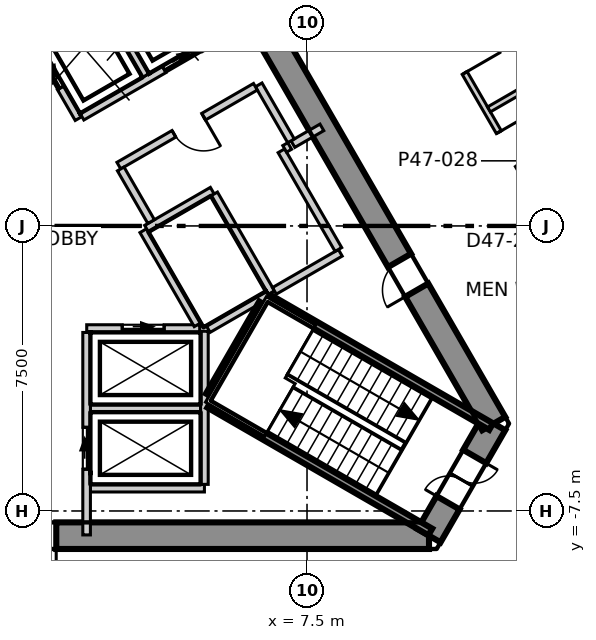
"""IFC4 building model, lengths in metres.
Left out: names, types, materials, properties, quantities, classifications, styles, units other than length and angle.
Written with IfcOpenShell. Run it as: python <this file> out.ifc"""

import sys

from ifc_helpers import new_model, si_unit, direction, frame, frame_2d, origin, place, context, subcontext, project, spatial, polyline, rectangle, outline, extrude, element, fill, save


model = new_model("IFC4")
c1 = context("Model", 3, precision=1e-05, world=origin(), true_north=direction((0.0, 1.0)))
c2 = subcontext(c1, "Body", "Model", "MODEL_VIEW")
j1 = project(units=[si_unit("LENGTHUNIT", "METRE"), si_unit("PLANEANGLEUNIT", "RADIAN")], contexts=[c1])
p1 = place(None, origin())
s1 = spatial("IfcSite", under=j1, at=p1, CompositionType="ELEMENT")
p2 = place(p1, origin())
s2 = spatial("IfcBuilding", under=s1, at=p2, CompositionType="ELEMENT")
p3 = place(p2, frame((0.0, 0.0, 203.3)))
s3 = spatial("IfcBuildingStorey", under=s2, at=p3, CompositionType="ELEMENT", Elevation=203.3)
p4 = place(p3, frame((-10.71, -8.15, -0.3), z_axis=(0.0, 0.0, 1.0), x_axis=(1.0, 0.0, 0.0)))
e1 = element("IfcWall", 1, at=p4, inside=s3, PredefinedType="SHEAR", context=c2, shape_type="SweptSolid", body=[
    extrude(outline(polyline([(-0.202, -0.35), (1.782, -0.35), (3.766, -0.35), (5.75, -0.35), (7.734, -0.35), (9.718, -0.35), (11.702, -0.35), (13.686, -0.35), (15.67, -0.35), (17.654, -0.35), (19.638, -0.35), (21.622, -0.35), (21.218, 0.35), (19.307, 0.35), (17.397, 0.35), (15.486, 0.35), (13.576, 0.35), (11.665, 0.35), (9.755, 0.35), (7.844, 0.35), (5.934, 0.35), (4.023, 0.35), (2.113, 0.35), (0.202, 0.35), (-0.202, -0.35)])), origin(), (0.0, 0.0, 1.0), 4.0),
])
p5 = place(p4, frame((9.81, 0.0, 0.3)))
e2 = element("IfcOpeningElement", 2, at=p5, cuts=e1, PredefinedType="OPENING", context=c2, shape_type="SweptSolid", body=[
    extrude(rectangle(XDim=1.8, YDim=2.1, at=frame_2d((0.9, 1.05))), frame((0.0, 0.36, 0.0), z_axis=(0.0, -1.0, 0.0), x_axis=(1.0, 0.0, 0.0)), (0.0, 0.0, 1.0), 0.72),
])
p6 = place(p3, frame((10.71, -8.15, -0.3), z_axis=(0.0, 0.0, 1.0), x_axis=(0.49999337185, 0.866029230515, 0.0)))
e3 = element("IfcWall", 3, at=p6, inside=s3, PredefinedType="SHEAR", context=c2, shape_type="SweptSolid", body=[
    extrude(outline(polyline([(-0.202, -0.35), (1.703, -0.35), (3.608, -0.35), (3.204, 0.35), (1.703, 0.35), (0.202, 0.35), (-0.202, -0.35)])), origin(), (0.0, 0.0, 1.0), 4.0),
])
p7 = place(p6, frame((1.003, 0.0, 0.3)))
e4 = element("IfcOpeningElement", 4, at=p7, cuts=e3, PredefinedType="OPENING", context=c2, shape_type="SweptSolid", body=[
    extrude(rectangle(XDim=1.4, YDim=2.1, at=frame_2d((0.7, 1.05))), frame((0.0, 0.36, 0.0), z_axis=(0.0, -1.0, 0.0), x_axis=(1.0, 0.0, 0.0)), (0.0, 0.0, 1.0), 0.72),
])
p8 = place(p3, frame((12.413, -5.2, -0.3), z_axis=(0.0, 0.0, 1.0), x_axis=(-0.500011533395, 0.866018744874, 0.0)))
e5 = element("IfcWall", 5, at=p8, inside=s3, PredefinedType="SHEAR", context=c2, shape_type="SweptSolid", body=[
    extrude(outline(polyline([(-0.202, -0.35), (1.782, -0.35), (3.766, -0.35), (5.75, -0.35), (7.734, -0.35), (9.718, -0.35), (11.702, -0.35), (13.686, -0.35), (15.67, -0.35), (17.654, -0.35), (19.638, -0.35), (21.622, -0.35), (21.218, 0.35), (19.307, 0.35), (17.397, 0.35), (15.486, 0.35), (13.576, 0.35), (11.665, 0.35), (9.755, 0.35), (7.844, 0.35), (5.934, 0.35), (4.023, 0.35), (2.113, 0.35), (0.202, 0.35), (-0.202, -0.35)])), origin(), (0.0, 0.0, 1.0), 4.0),
])
p9 = place(p8, frame((4.055, 0.0, 0.3)))
e6 = element("IfcOpeningElement", 6, at=p9, cuts=e5, PredefinedType="OPENING", context=c2, shape_type="SweptSolid", body=[
    extrude(rectangle(XDim=0.9, YDim=2.1, at=frame_2d((0.45, 1.05))), frame((0.0, 0.36, 0.0), z_axis=(0.0, -1.0, 0.0), x_axis=(1.0, 0.0, 0.0)), (0.0, 0.0, 1.0), 0.72),
])
p10 = place(p8, frame((16.415, 0.0, 0.3)))
e7 = element("IfcOpeningElement", 7, at=p10, cuts=e5, PredefinedType="OPENING", context=c2, shape_type="SweptSolid", body=[
    extrude(rectangle(XDim=1.0, YDim=2.1, at=frame_2d((0.5, 1.05))), frame((0.0, 0.36, 0.0), z_axis=(0.0, -1.0, 0.0), x_axis=(1.0, 0.0, 0.0)), (0.0, 0.0, 1.0), 0.72),
])
p11 = place(p3, frame((28.704, -13.311, 0.0), z_axis=(0.0, 0.0, 1.0), x_axis=(-0.500010281129, 0.866019467891, 0.0)))
e8 = element("IfcWall", 8, at=p11, inside=s3, PredefinedType="ELEMENTEDWALL", context=c2, shape_type="SweptSolid", body=[
    extrude(rectangle(XDim=51.739, YDim=0.2, at=frame_2d((25.87, 0.0))), origin(), (0.0, 0.0, 1.0), 3.7),
])
p12 = place(p11, frame((2.275, 0.0, 0.9)))
e9 = element("IfcOpeningElement", 9, at=p12, cuts=e8, PredefinedType="OPENING", context=c2, shape_type="SweptSolid", body=[
    extrude(rectangle(XDim=4.2, YDim=2.5, at=frame_2d((2.1, 1.25))), frame((0.0, 0.11, 0.0), z_axis=(0.0, -1.0, 0.0), x_axis=(1.0, 0.0, 0.0)), (0.0, 0.0, 1.0), 0.22),
])
p13 = place(p11, frame((8.419, 0.0, 0.9)))
e10 = element("IfcOpeningElement", 10, at=p13, cuts=e8, PredefinedType="OPENING", context=c2, shape_type="SweptSolid", body=[
    extrude(rectangle(XDim=4.2, YDim=2.5, at=frame_2d((2.1, 1.25))), frame((0.0, 0.11, 0.0), z_axis=(0.0, -1.0, 0.0), x_axis=(1.0, 0.0, 0.0)), (0.0, 0.0, 1.0), 0.22),
])
p14 = place(p11, frame((14.563, 0.0, 0.9)))
e11 = element("IfcOpeningElement", 11, at=p14, cuts=e8, PredefinedType="OPENING", context=c2, shape_type="SweptSolid", body=[
    extrude(rectangle(XDim=4.2, YDim=2.5, at=frame_2d((2.1, 1.25))), frame((0.0, 0.11, 0.0), z_axis=(0.0, -1.0, 0.0), x_axis=(1.0, 0.0, 0.0)), (0.0, 0.0, 1.0), 0.22),
])
p15 = place(p11, frame((20.707, 0.0, 0.9)))
e12 = element("IfcOpeningElement", 12, at=p15, cuts=e8, PredefinedType="OPENING", context=c2, shape_type="SweptSolid", body=[
    extrude(rectangle(XDim=4.2, YDim=2.5, at=frame_2d((2.1, 1.25))), frame((0.0, 0.11, 0.0), z_axis=(0.0, -1.0, 0.0), x_axis=(1.0, 0.0, 0.0)), (0.0, 0.0, 1.0), 0.22),
])
p16 = place(p11, frame((26.852, 0.0, 0.9)))
e13 = element("IfcOpeningElement", 13, at=p16, cuts=e8, PredefinedType="OPENING", context=c2, shape_type="SweptSolid", body=[
    extrude(rectangle(XDim=4.2, YDim=2.5, at=frame_2d((2.1, 1.25))), frame((0.0, 0.11, 0.0), z_axis=(0.0, -1.0, 0.0), x_axis=(1.0, 0.0, 0.0)), (0.0, 0.0, 1.0), 0.22),
])
p17 = place(p11, frame((32.996, 0.0, 0.9)))
e14 = element("IfcOpeningElement", 14, at=p17, cuts=e8, PredefinedType="OPENING", context=c2, shape_type="SweptSolid", body=[
    extrude(rectangle(XDim=4.2, YDim=2.5, at=frame_2d((2.1, 1.25))), frame((0.0, 0.11, 0.0), z_axis=(0.0, -1.0, 0.0), x_axis=(1.0, 0.0, 0.0)), (0.0, 0.0, 1.0), 0.22),
])
p18 = place(p11, frame((39.14, 0.0, 0.9)))
e15 = element("IfcOpeningElement", 15, at=p18, cuts=e8, PredefinedType="OPENING", context=c2, shape_type="SweptSolid", body=[
    extrude(rectangle(XDim=4.2, YDim=2.5, at=frame_2d((2.1, 1.25))), frame((0.0, 0.11, 0.0), z_axis=(0.0, -1.0, 0.0), x_axis=(1.0, 0.0, 0.0)), (0.0, 0.0, 1.0), 0.22),
])
p19 = place(p11, frame((45.284, 0.0, 0.9)))
e16 = element("IfcOpeningElement", 16, at=p19, cuts=e8, PredefinedType="OPENING", context=c2, shape_type="SweptSolid", body=[
    extrude(rectangle(XDim=4.2, YDim=2.5, at=frame_2d((2.1, 1.25))), frame((0.0, 0.11, 0.0), z_axis=(0.0, -1.0, 0.0), x_axis=(1.0, 0.0, 0.0)), (0.0, 0.0, 1.0), 0.22),
])
p20 = place(p3, frame((0.075, 24.07, 0.0), z_axis=(0.0, 0.0, 1.0), x_axis=(0.500006834213, -0.866021458014, 0.0)))
e17 = element("IfcWall", 17, at=p20, inside=s3, PredefinedType="PARTITIONING", context=c2, shape_type="SweptSolid", body=[
    extrude(rectangle(XDim=41.616, YDim=0.15, at=frame_2d((20.808, 0.0))), origin(), (0.0, 0.0, 1.0), 3.7),
])
p21 = place(p20, frame((36.915, 0.0, 0.0)))
e18 = element("IfcOpeningElement", 18, at=p21, cuts=e17, PredefinedType="OPENING", context=c2, shape_type="SweptSolid", body=[
    extrude(rectangle(XDim=1.1, YDim=2.1, at=frame_2d((0.55, 1.05))), frame((0.0, 0.085, 0.0), z_axis=(0.0, -1.0, 0.0), x_axis=(1.0, 0.0, 0.0)), (0.0, 0.0, 1.0), 0.17),
])
p22 = place(p20, frame((22.046, 0.0, 0.0)))
e19 = element("IfcOpeningElement", 19, at=p22, cuts=e17, PredefinedType="OPENING", context=c2, shape_type="SweptSolid", body=[
    extrude(rectangle(XDim=1.1, YDim=2.1, at=frame_2d((0.55, 1.05))), frame((0.0, 0.085, 0.0), z_axis=(0.0, -1.0, 0.0), x_axis=(1.0, 0.0, 0.0)), (0.0, 0.0, 1.0), 0.17),
])
p23 = place(p20, frame((31.046, 0.0, 0.0)))
e20 = element("IfcOpeningElement", 20, at=p23, cuts=e17, PredefinedType="OPENING", context=c2, shape_type="SweptSolid", body=[
    extrude(rectangle(XDim=0.9, YDim=2.1, at=frame_2d((0.45, 1.05))), frame((0.0, 0.085, 0.0), z_axis=(0.0, -1.0, 0.0), x_axis=(1.0, 0.0, 0.0)), (0.0, 0.0, 1.0), 0.17),
])
p24 = place(p20, frame((27.846, 0.0, 0.0)))
e21 = element("IfcOpeningElement", 21, at=p24, cuts=e17, PredefinedType="OPENING", context=c2, shape_type="SweptSolid", body=[
    extrude(rectangle(XDim=0.9, YDim=2.1, at=frame_2d((0.45, 1.05))), frame((0.0, 0.085, 0.0), z_axis=(0.0, -1.0, 0.0), x_axis=(1.0, 0.0, 0.0)), (0.0, 0.0, 1.0), 0.17),
])
p25 = place(p20, frame((24.946, 0.0, 0.0)))
e22 = element("IfcOpeningElement", 22, at=p25, cuts=e17, PredefinedType="OPENING", context=c2, shape_type="SweptSolid", body=[
    extrude(rectangle(XDim=1.0, YDim=2.1, at=frame_2d((0.5, 1.05))), frame((0.0, 0.085, 0.0), z_axis=(0.0, -1.0, 0.0), x_axis=(1.0, 0.0, 0.0)), (0.0, 0.0, 1.0), 0.17),
])
p26 = place(p20, frame((17.258, 0.0, 0.0)))
e23 = element("IfcOpeningElement", 23, at=p26, cuts=e17, PredefinedType="OPENING", context=c2, shape_type="SweptSolid", body=[
    extrude(rectangle(XDim=1.0, YDim=2.1, at=frame_2d((0.5, 1.05))), frame((0.0, 0.085, 0.0), z_axis=(0.0, -1.0, 0.0), x_axis=(1.0, 0.0, 0.0)), (0.0, 0.0, 1.0), 0.17),
])
p27 = place(p20, frame((11.114, 0.0, 0.0)))
e24 = element("IfcOpeningElement", 24, at=p27, cuts=e17, PredefinedType="OPENING", context=c2, shape_type="SweptSolid", body=[
    extrude(rectangle(XDim=1.0, YDim=2.1, at=frame_2d((0.5, 1.05))), frame((0.0, 0.085, 0.0), z_axis=(0.0, -1.0, 0.0), x_axis=(1.0, 0.0, 0.0)), (0.0, 0.0, 1.0), 0.17),
])
p28 = place(p20, frame((3.669, 0.0, 0.0)))
e25 = element("IfcOpeningElement", 25, at=p28, cuts=e17, PredefinedType="OPENING", context=c2, shape_type="SweptSolid", body=[
    extrude(rectangle(XDim=1.0, YDim=2.1, at=frame_2d((0.5, 1.05))), frame((0.0, 0.085, 0.0), z_axis=(0.0, -1.0, 0.0), x_axis=(1.0, 0.0, 0.0)), (0.0, 0.0, 1.0), 0.17),
])
p29 = place(p3, frame((12.288, 3.066, 0.0), z_axis=(0.0, 0.0, 1.0), x_axis=(0.865976813117, 0.500084152062, 0.0)))
e26 = element("IfcWall", 26, at=p29, inside=s3, PredefinedType="PARTITIONING", context=c2, shape_type="SweptSolid", body=[
    extrude(rectangle(XDim=2.902, YDim=0.15, at=frame_2d((1.451, 0.0))), origin(), (0.0, 0.0, 1.0), 3.7),
])
p30 = place(p3, frame((1.8, -4.8, 0.0), z_axis=(0.0, 0.0, 1.0), x_axis=(1.0, 0.0, 0.0)))
e27 = element("IfcWall", 27, at=p30, inside=s3, PredefinedType="SOLIDWALL", context=c2, shape_type="SweptSolid", body=[
    extrude(rectangle(XDim=2.9, YDim=0.2, at=frame_2d((1.45, 0.0))), origin(), (0.0, 0.0, 1.0), 3.7),
])
p31 = place(p3, frame((1.8, -6.9, 0.0), z_axis=(0.0, 0.0, 1.0), x_axis=(1.0, 0.0, 0.0)))
e28 = element("IfcWall", 28, at=p31, inside=s3, PredefinedType="SOLIDWALL", context=c2, shape_type="SweptSolid", body=[
    extrude(rectangle(XDim=3.0, YDim=0.2, at=frame_2d((1.5, 0.0))), origin(), (0.0, 0.0, 1.0), 3.7),
])
p32 = place(p3, frame((1.703, -2.7, 0.0), z_axis=(0.0, 0.0, 1.0), x_axis=(1.0, 0.0, 0.0)))
e29 = element("IfcWall", 29, at=p32, inside=s3, PredefinedType="SOLIDWALL", context=c2, shape_type="SweptSolid", body=[
    extrude(rectangle(XDim=2.973, YDim=0.2, at=frame_2d((1.487, 0.0))), origin(), (0.0, 0.0, 1.0), 3.7),
])
p33 = place(p32, frame((0.936, 0.0, 0.0)))
e30 = element("IfcOpeningElement", 30, at=p33, cuts=e29, PredefinedType="OPENING", context=c2, shape_type="SweptSolid", body=[
    extrude(rectangle(XDim=1.1, YDim=2.1, at=frame_2d((0.55, 1.05))), frame((0.0, 0.11, 0.0), z_axis=(0.0, -1.0, 0.0), x_axis=(1.0, 0.0, 0.0)), (0.0, 0.0, 1.0), 0.22),
])
p34 = place(p3, frame((0.0, 5.4, 0.0), z_axis=(0.0, 0.0, 1.0), x_axis=(0.500103862429, -0.865965430478, 0.0)))
e31 = element("IfcWall", 31, at=p34, inside=s3, PredefinedType="SOLIDWALL", context=c2, shape_type="SweptSolid", body=[
    extrude(rectangle(XDim=2.973, YDim=0.2, at=frame_2d((1.487, 0.0))), origin(), (0.0, 0.0, 1.0), 3.7),
])
p35 = place(p34, frame((0.937, 0.0, 0.0)))
e32 = element("IfcOpeningElement", 32, at=p35, cuts=e31, PredefinedType="OPENING", context=c2, shape_type="SweptSolid", body=[
    extrude(rectangle(XDim=1.1, YDim=2.1, at=frame_2d((0.55, 1.05))), frame((0.0, 0.11, 0.0), z_axis=(0.0, -1.0, 0.0), x_axis=(1.0, 0.0, 0.0)), (0.0, 0.0, 1.0), 0.22),
])
p36 = place(p3, frame((3.19, -0.125, 0.0), z_axis=(0.0, 0.0, 1.0), x_axis=(0.499988658015, -0.866031951983, 0.0)))
e33 = element("IfcWall", 33, at=p36, inside=s3, PredefinedType="SOLIDWALL", context=c2, shape_type="SweptSolid", body=[
    extrude(rectangle(XDim=2.858, YDim=0.2, at=frame_2d((1.429, 0.0))), origin(), (0.0, 0.0, 1.0), 3.7),
])
p37 = place(p3, frame((1.578, 2.874, 0.0), z_axis=(0.0, 0.0, 1.0), x_axis=(0.866045911672, 0.499964477614, 0.0)))
e34 = element("IfcWall", 34, at=p37, inside=s3, PredefinedType="SOLIDWALL", context=c2, shape_type="SweptSolid", body=[
    extrude(rectangle(XDim=5.327, YDim=0.2, at=frame_2d((2.663, 0.0))), origin(), (0.0, 0.0, 1.0), 3.7),
])
p38 = place(p37, frame((2.496, 0.0, 0.0)))
e35 = element("IfcOpeningElement", 35, at=p38, cuts=e34, PredefinedType="OPENING", context=c2, shape_type="SweptSolid", body=[
    extrude(rectangle(XDim=1.1, YDim=2.1, at=frame_2d((0.55, 1.05))), frame((0.0, 0.11, 0.0), z_axis=(0.0, -1.0, 0.0), x_axis=(1.0, 0.0, 0.0)), (0.0, 0.0, 1.0), 0.22),
])
p39 = place(p3, frame((1.7, -8.13, 0.0), z_axis=(0.0, 0.0, 1.0), x_axis=(0.0, 1.0, 0.0)))
e36 = element("IfcWall", 36, at=p39, inside=s3, PredefinedType="SOLIDWALL", context=c2, shape_type="SweptSolid", body=[
    extrude(rectangle(XDim=5.327, YDim=0.2, at=frame_2d((2.664, 0.0))), origin(), (0.0, 0.0, 1.0), 3.7),
])
p40 = place(p39, frame((1.73, 0.0, 0.0)))
e37 = element("IfcOpeningElement", 37, at=p40, cuts=e36, PredefinedType="OPENING", context=c2, shape_type="SweptSolid", body=[
    extrude(rectangle(XDim=1.1, YDim=2.1, at=frame_2d((0.55, 1.05))), frame((0.0, 0.11, 0.0), z_axis=(0.0, -1.0, 0.0), x_axis=(1.0, 0.0, 0.0)), (0.0, 0.0, 1.0), 0.22),
])
p41 = place(p3, frame((4.8, -6.8, 0.0), z_axis=(0.0, 0.0, 1.0), x_axis=(0.0, 1.0, 0.0)))
e38 = element("IfcWall", 38, at=p41, inside=s3, PredefinedType="SOLIDWALL", context=c2, shape_type="SweptSolid", body=[
    extrude(rectangle(XDim=4.029, YDim=0.2, at=frame_2d((2.015, 0.0))), origin(), (0.0, 0.0, 1.0), 3.7),
])
p42 = place(p3, frame((3.278, -0.071, 0.0), z_axis=(0.0, 0.0, 1.0), x_axis=(0.865855657918, 0.500293893279, 0.0)))
e39 = element("IfcWall", 39, at=p42, inside=s3, PredefinedType="SOLIDWALL", context=c2, shape_type="SweptSolid", body=[
    extrude(rectangle(XDim=1.997, YDim=0.2, at=frame_2d((0.999, 0.0))), origin(), (0.0, 0.0, 1.0), 3.7),
])
p43 = place(p3, frame((7.129, 2.153, 0.0), z_axis=(0.0, 0.0, 1.0), x_axis=(0.866083962871, 0.499898558967, 0.0)))
e40 = element("IfcWall", 40, at=p43, inside=s3, PredefinedType="SOLIDWALL", context=c2, shape_type="SweptSolid", body=[
    extrude(rectangle(XDim=0.88, YDim=0.2, at=frame_2d((0.44, 0.0))), origin(), (0.0, 0.0, 1.0), 3.7),
])
p44 = place(p3, frame((1.807, 6.47, 0.0), z_axis=(0.0, 0.0, 1.0), x_axis=(0.50012328804, -0.865954211699, 0.0)))
e41 = element("IfcWall", 41, at=p44, inside=s3, PredefinedType="SOLIDWALL", context=c2, shape_type="SweptSolid", body=[
    extrude(rectangle(XDim=2.9, YDim=0.2, at=frame_2d((1.45, 0.0))), origin(), (0.0, 0.0, 1.0), 3.7),
])
p45 = place(p3, frame((5.057, 0.841, 0.0), z_axis=(0.0, 0.0, 1.0), x_axis=(0.499990139034, -0.866031096941, 0.0)))
e42 = element("IfcWall", 42, at=p45, inside=s3, PredefinedType="SOLIDWALL", context=c2, shape_type="SweptSolid", body=[
    extrude(rectangle(XDim=3.0, YDim=0.2, at=frame_2d((1.5, 0.0))), origin(), (0.0, 0.0, 1.0), 3.7),
])
p46 = place(p3, frame((4.9, -2.714, 0.0), z_axis=(0.0, 0.0, 1.0), x_axis=(0.865846928409, 0.500309001083, 0.0)))
e43 = element("IfcWall", 43, at=p46, inside=s3, PredefinedType="SOLIDWALL", context=c2, shape_type="SweptSolid", body=[
    extrude(rectangle(XDim=1.813, YDim=0.2, at=frame_2d((0.907, 0.0))), origin(), (0.0, 0.0, 1.0), 3.7),
])
p47 = place(p3, frame((6.229, 3.712, 0.0), z_axis=(0.0, 0.0, 1.0), x_axis=(0.499875724984, -0.86609714211, 0.0)))
e44 = element("IfcWall", 44, at=p47, inside=s3, PredefinedType="SOLIDWALL", context=c2, shape_type="SweptSolid", body=[
    extrude(rectangle(XDim=1.701, YDim=0.2, at=frame_2d((0.85, 0.0))), origin(), (0.0, 0.0, 1.0), 3.7),
])
p48 = place(p3, frame((2.548, 1.587, 0.0), z_axis=(0.0, 0.0, 1.0), x_axis=(0.866004344652, 0.500036473714, 0.0)))
e45 = element("IfcWall", 45, at=p48, inside=s3, PredefinedType="SOLIDWALL", context=c2, shape_type="SweptSolid", body=[
    extrude(rectangle(XDim=4.15, YDim=0.2, at=frame_2d((2.075, 0.0))), origin(), (0.0, 0.0, 1.0), 3.7),
])
p49 = place(p48, frame((1.675, 0.0, 0.0)))
e46 = element("IfcOpeningElement", 46, at=p49, cuts=e45, PredefinedType="OPENING", context=c2, shape_type="SweptSolid", body=[
    extrude(rectangle(XDim=0.9, YDim=2.1, at=frame_2d((0.45, 1.05))), frame((0.0, 0.11, 0.0), z_axis=(0.0, -1.0, 0.0), x_axis=(1.0, 0.0, 0.0)), (0.0, 0.0, 1.0), 0.22),
])
p50 = place(p3, frame((2.598, 1.5, 0.0), z_axis=(0.0, 0.0, 1.0), x_axis=(0.499929347863, -0.866066190972, 0.0)))
e47 = element("IfcWall", 47, at=p50, inside=s3, PredefinedType="SOLIDWALL", context=c2, shape_type="SweptSolid", body=[
    extrude(rectangle(XDim=1.6, YDim=0.2, at=frame_2d((0.8, 0.0))), origin(), (0.0, 0.0, 1.0), 3.7),
])
p51 = place(p3, frame((6.642, -1.708, 0.0), z_axis=(0.0, 0.0, 1.0), x_axis=(0.866043441391, 0.499968756647, 0.0)))
e48 = element("IfcWall", 48, at=p51, inside=s3, PredefinedType="SOLIDWALL", context=c2, shape_type="SweptSolid", body=[
    extrude(rectangle(XDim=2.002, YDim=0.2, at=frame_2d((1.001, 0.0))), origin(), (0.0, 0.0, 1.0), 3.7),
])
p52 = place(p3, frame((6.826, 1.978, 0.0), z_axis=(0.0, 0.0, 1.0), x_axis=(0.499990139034, -0.866031096941, 0.0)))
e49 = element("IfcWall", 49, at=p52, inside=s3, PredefinedType="SOLIDWALL", context=c2, shape_type="SweptSolid", body=[
    extrude(rectangle(XDim=3.0, YDim=0.2, at=frame_2d((1.5, 0.0))), origin(), (0.0, 0.0, 1.0), 3.7),
])
p53 = place(p3, frame((6.912, 2.028, 0.0), z_axis=(0.0, 0.0, 1.0), x_axis=(0.866559367082, 0.499074005857, 0.0)))
e50 = element("IfcWall", 50, at=p53, inside=s3, PredefinedType="SOLIDWALL", context=c2, shape_type="SweptSolid", body=[
    extrude(rectangle(XDim=0.152, YDim=0.2, at=frame_2d((0.076, 0.0))), origin(), (0.0, 0.0, 1.0), 3.7),
])
p54 = place(p3, frame((4.929, -4.693, 0.0), z_axis=(0.0, 0.0, 1.0), x_axis=(0.865983344943, -0.500072840975, 0.0)))
e51 = element("IfcWall", 51, at=p54, inside=s3, PredefinedType="SOLIDWALL", context=c2, shape_type="SweptSolid", body=[
    extrude(rectangle(XDim=6.715, YDim=0.2, at=frame_2d((3.357, 0.0))), origin(), (0.0, 0.0, 1.0), 3.7),
])
p55 = place(p3, frame((4.929, -4.462, 0.0), z_axis=(0.0, 0.0, 1.0), x_axis=(0.500200581029, 0.865909567298, 0.0)))
e52 = element("IfcWall", 52, at=p55, inside=s3, PredefinedType="SOLIDWALL", context=c2, shape_type="SweptSolid", body=[
    extrude(rectangle(XDim=2.799, YDim=0.2, at=frame_2d((1.399, 0.0))), origin(), (0.0, 0.0, 1.0), 3.7),
])
p56 = place(p3, frame((6.529, -1.922, 0.0), z_axis=(0.0, 0.0, 1.0), x_axis=(0.866046323291, -0.499963764601, 0.0)))
e53 = element("IfcWall", 53, at=p56, inside=s3, PredefinedType="SOLIDWALL", context=c2, shape_type="SweptSolid", body=[
    extrude(rectangle(XDim=6.714, YDim=0.2, at=frame_2d((3.357, 0.0))), origin(), (0.0, 0.0, 1.0), 3.7),
])
p57 = place(p33, origin())
e54 = element("IfcDoor", 54, at=p57, inside=s3, OperationType="SLIDING_TO_LEFT", PredefinedType="DOOR", context=c2, shape_type="SweptSolid", body=[
    extrude(rectangle(XDim=1.1, YDim=2.1, at=frame_2d((0.55, 1.05))), frame((0.0, 0.025, 0.0), z_axis=(0.0, -1.0, 0.0), x_axis=(1.0, 0.0, 0.0)), (0.0, 0.0, 1.0), 0.05),
])
fill(e30, e54)
p58 = place(p40, origin())
e55 = element("IfcDoor", 55, at=p58, inside=s3, OperationType="SLIDING_TO_LEFT", PredefinedType="DOOR", context=c2, shape_type="SweptSolid", body=[
    extrude(rectangle(XDim=1.1, YDim=2.1, at=frame_2d((0.55, 1.05))), frame((0.0, 0.025, 0.0), z_axis=(0.0, -1.0, 0.0), x_axis=(1.0, 0.0, 0.0)), (0.0, 0.0, 1.0), 0.05),
])
fill(e37, e55)
p59 = place(p35, origin())
e56 = element("IfcDoor", 56, at=p59, inside=s3, OperationType="SLIDING_TO_LEFT", PredefinedType="DOOR", context=c2, shape_type="SweptSolid", body=[
    extrude(rectangle(XDim=1.1, YDim=2.1, at=frame_2d((0.55, 1.05))), frame((0.0, 0.025, 0.0), z_axis=(0.0, -1.0, 0.0), x_axis=(1.0, 0.0, 0.0)), (0.0, 0.0, 1.0), 0.05),
])
fill(e32, e56)
p60 = place(p38, origin())
e57 = element("IfcDoor", 57, at=p60, inside=s3, OperationType="SLIDING_TO_LEFT", PredefinedType="DOOR", context=c2, shape_type="SweptSolid", body=[
    extrude(rectangle(XDim=1.1, YDim=2.1, at=frame_2d((0.55, 1.05))), frame((0.0, 0.025, 0.0), z_axis=(0.0, -1.0, 0.0), x_axis=(1.0, 0.0, 0.0)), (0.0, 0.0, 1.0), 0.05),
])
fill(e35, e57)
p61 = place(p22, origin())
e58 = element("IfcDoor", 58, at=p61, inside=s3, OperationType="SINGLE_SWING_LEFT", PredefinedType="DOOR", context=c2, shape_type="SweptSolid", body=[
    extrude(rectangle(XDim=1.1, YDim=2.1, at=frame_2d((0.55, 1.05))), frame((0.0, 0.025, 0.0), z_axis=(0.0, -1.0, 0.0), x_axis=(1.0, 0.0, 0.0)), (0.0, 0.0, 1.0), 0.05),
])
fill(e19, e58)
p62 = place(p25, origin())
e59 = element("IfcDoor", 59, at=p62, inside=s3, OperationType="SINGLE_SWING_RIGHT", PredefinedType="DOOR", context=c2, shape_type="SweptSolid", body=[
    extrude(rectangle(XDim=1.0, YDim=2.1, at=frame_2d((0.5, 1.05))), frame((0.0, 0.025, 0.0), z_axis=(0.0, -1.0, 0.0), x_axis=(1.0, 0.0, 0.0)), (0.0, 0.0, 1.0), 0.05),
])
fill(e22, e59)
p63 = place(p5, origin())
e60 = element("IfcDoor", 60, at=p63, inside=s3, OperationType="DOUBLE_DOOR_SINGLE_SWING", PredefinedType="DOOR", context=c2, shape_type="SweptSolid", body=[
    extrude(rectangle(XDim=1.8, YDim=2.1, at=frame_2d((0.9, 1.05))), frame((0.0, 0.025, 0.0), z_axis=(0.0, -1.0, 0.0), x_axis=(1.0, 0.0, 0.0)), (0.0, 0.0, 1.0), 0.05),
])
fill(e2, e60)
p64 = place(p7, origin())
e61 = element("IfcDoor", 61, at=p64, inside=s3, OperationType="DOUBLE_DOOR_SINGLE_SWING", PredefinedType="DOOR", context=c2, shape_type="SweptSolid", body=[
    extrude(rectangle(XDim=1.4, YDim=2.1, at=frame_2d((0.7, 1.05))), frame((0.0, 0.025, 0.0), z_axis=(0.0, -1.0, 0.0), x_axis=(1.0, 0.0, 0.0)), (0.0, 0.0, 1.0), 0.05),
])
fill(e4, e61)
p65 = place(p9, origin())
e62 = element("IfcDoor", 62, at=p65, inside=s3, OperationType="SINGLE_SWING_RIGHT", PredefinedType="DOOR", context=c2, shape_type="SweptSolid", body=[
    extrude(rectangle(XDim=0.9, YDim=2.1, at=frame_2d((0.45, 1.05))), frame((0.0, 0.025, 0.0), z_axis=(0.0, -1.0, 0.0), x_axis=(1.0, 0.0, 0.0)), (0.0, 0.0, 1.0), 0.05),
])
fill(e6, e62)
p66 = place(p49, origin())
e63 = element("IfcDoor", 63, at=p66, inside=s3, OperationType="SINGLE_SWING_RIGHT", PredefinedType="DOOR", context=c2, shape_type="SweptSolid", body=[
    extrude(rectangle(XDim=0.9, YDim=2.1, at=frame_2d((0.45, 1.05))), frame((0.0, 0.025, 0.0), z_axis=(0.0, -1.0, 0.0), x_axis=(1.0, 0.0, 0.0)), (0.0, 0.0, 1.0), 0.05),
])
fill(e46, e63)
save(model, sys.argv[1])
